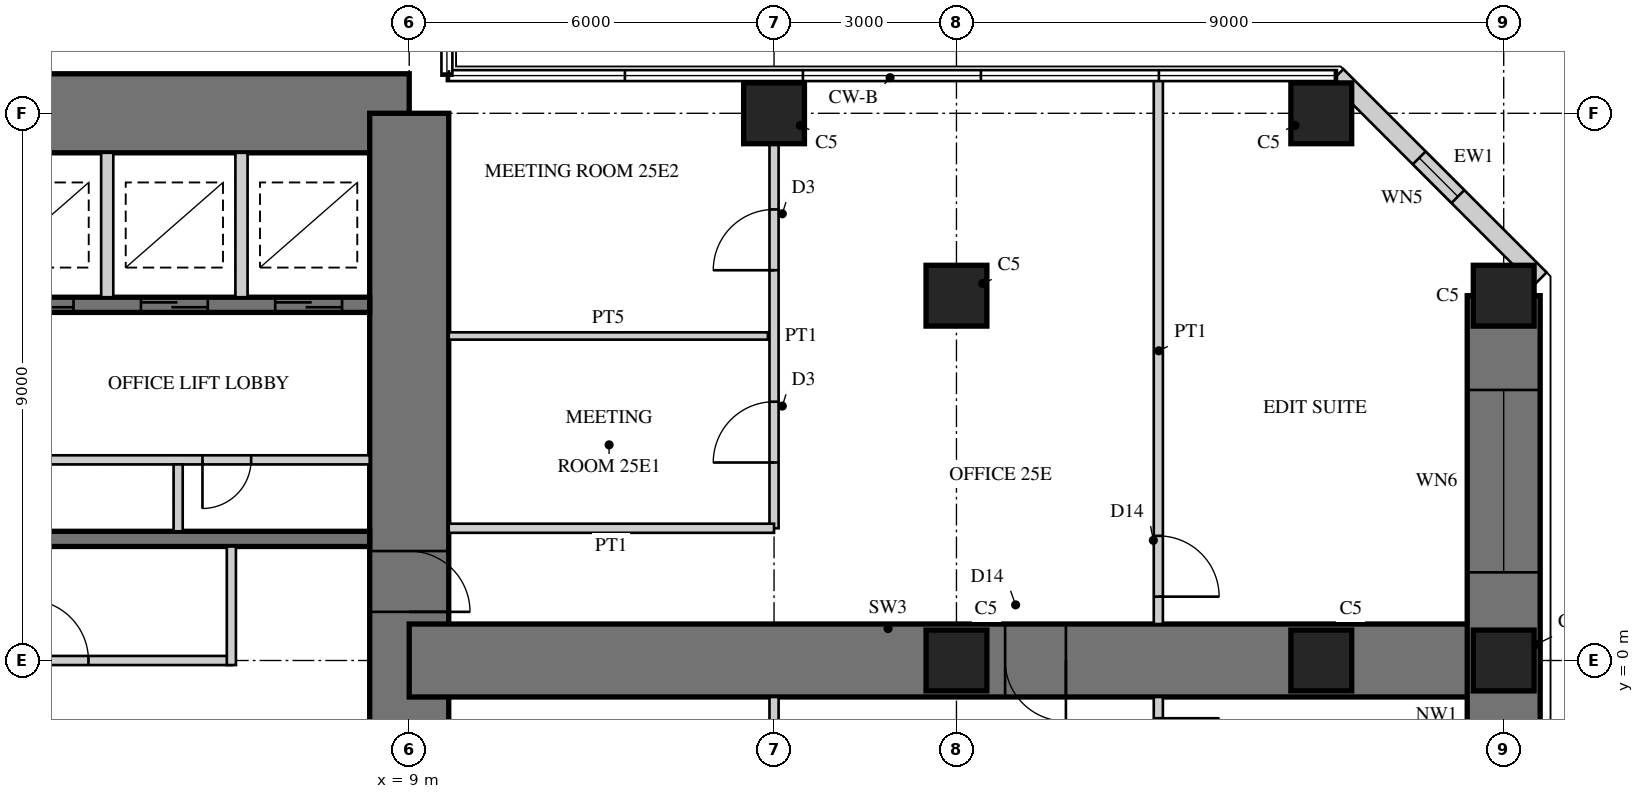
"""IFC4 building model, lengths in metres.
Left out: names, types, materials, properties, quantities, classifications, styles, units other than length and angle.
Written with IfcOpenShell. Run it as: python <this file> out.ifc"""

import sys

from ifc_helpers import new_model, si_unit, direction, frame, frame_2d, origin, origin_2d, place, context, subcontext, project, spatial, rectangle, hollow_rectangle, extrude, element, fill, save


model = new_model("IFC4")
c1 = context("Model", 3, precision=1e-05, world=origin(), true_north=direction((0.0, 1.0)))
c2 = subcontext(c1, "Body", "Model", "MODEL_VIEW")
j1 = project(units=[si_unit("LENGTHUNIT", "METRE"), si_unit("PLANEANGLEUNIT", "RADIAN")], contexts=[c1])
p1 = place(None, origin())
s1 = spatial("IfcSite", under=j1, at=p1, CompositionType="ELEMENT")
p2 = place(p1, origin())
s2 = spatial("IfcBuilding", under=s1, at=p2, CompositionType="ELEMENT")
p3 = place(p2, frame((0.0, 0.0, 104.5)))
s3 = spatial("IfcBuildingStorey", under=s2, at=p3, CompositionType="ELEMENT", Elevation=104.5)
p4 = place(p3, frame((9.0, 9.0, 0.0), z_axis=(0.0, 0.0, 1.0), x_axis=(-1.0, 0.0, 0.0)))
e1 = element("IfcWall", 1, at=p4, inside=s3, PredefinedType="SHEAR", context=c2, shape_type="SweptSolid", body=[
    extrude(rectangle(XDim=18.0, YDim=1.3, at=frame_2d((9.0, 0.0))), origin(), (0.0, 0.0, 1.0), 4.0),
])
p5 = place(p4, frame((9.8, 0.0, 0.0)))
e2 = element("IfcOpeningElement", 2, at=p5, cuts=e1, PredefinedType="OPENING", context=c2, shape_type="SweptSolid", body=[
    extrude(rectangle(XDim=1.0, YDim=2.4, at=frame_2d((0.5, 1.2))), frame((0.0, 0.66, 0.0), z_axis=(0.0, -1.0, 0.0), x_axis=(1.0, 0.0, 0.0)), (0.0, 0.0, 1.0), 1.32),
])
p6 = place(p3, frame((9.0, -9.0, 0.0), z_axis=(0.0, 0.0, 1.0), x_axis=(0.0, 1.0, 0.0)))
e3 = element("IfcWall", 3, at=p6, inside=s3, PredefinedType="SHEAR", context=c2, shape_type="SweptSolid", body=[
    extrude(rectangle(XDim=18.0, YDim=1.3, at=frame_2d((9.0, 0.0))), origin(), (0.0, 0.0, 1.0), 4.0),
])
p7 = place(p6, frame((9.8, 0.0, 0.0)))
e4 = element("IfcOpeningElement", 4, at=p7, cuts=e3, PredefinedType="OPENING", context=c2, shape_type="SweptSolid", body=[
    extrude(rectangle(XDim=1.0, YDim=2.4, at=frame_2d((0.5, 1.2))), frame((0.0, 0.66, 0.0), z_axis=(0.0, -1.0, 0.0), x_axis=(1.0, 0.0, 0.0)), (0.0, 0.0, 1.0), 1.32),
])
p8 = place(p3, frame((1.925, 2.0, 0.0), z_axis=(0.0, 0.0, 1.0), x_axis=(1.0, 0.0, 0.0)))
e5 = element("IfcWall", 5, at=p8, inside=s3, PredefinedType="SHEAR", context=c2, shape_type="SweptSolid", body=[
    extrude(rectangle(XDim=6.425, YDim=0.25, at=frame_2d((3.212, 0.0))), origin(), (0.0, 0.0, 1.0), 4.0),
])
p9 = place(p3, frame((1.925, 5.85, 0.0), z_axis=(0.0, 0.0, 1.0), x_axis=(1.0, 0.0, 0.0)))
e6 = element("IfcWall", 6, at=p9, inside=s3, PredefinedType="SHEAR", context=c2, shape_type="SweptSolid", body=[
    extrude(rectangle(XDim=6.425, YDim=0.25, at=frame_2d((3.212, 0.0))), origin(), (0.0, 0.0, 1.0), 4.0),
])
p10 = place(p9, frame((0.454, 0.0, 0.0)))
e7 = element("IfcOpeningElement", 7, at=p10, cuts=e6, PredefinedType="OPENING", context=c2, shape_type="SweptSolid", body=[
    extrude(rectangle(XDim=1.1, YDim=2.2, at=frame_2d((0.55, 1.1))), frame((0.0, 0.135, 0.0), z_axis=(0.0, -1.0, 0.0), x_axis=(1.0, 0.0, 0.0)), (0.0, 0.0, 1.0), 0.27),
])
p11 = place(p9, frame((2.663, 0.0, 0.0)))
e8 = element("IfcOpeningElement", 8, at=p11, cuts=e6, PredefinedType="OPENING", context=c2, shape_type="SweptSolid", body=[
    extrude(rectangle(XDim=1.1, YDim=2.2, at=frame_2d((0.55, 1.1))), frame((0.0, 0.135, 0.0), z_axis=(0.0, -1.0, 0.0), x_axis=(1.0, 0.0, 0.0)), (0.0, 0.0, 1.0), 0.27),
])
p12 = place(p9, frame((4.871, 0.0, 0.0)))
e9 = element("IfcOpeningElement", 9, at=p12, cuts=e6, PredefinedType="OPENING", context=c2, shape_type="SweptSolid", body=[
    extrude(rectangle(XDim=1.1, YDim=2.2, at=frame_2d((0.55, 1.1))), frame((0.0, 0.135, 0.0), z_axis=(0.0, -1.0, 0.0), x_axis=(1.0, 0.0, 0.0)), (0.0, 0.0, 1.0), 0.27),
])
p13 = place(p3, frame((1.925, 3.3, 0.0), z_axis=(0.0, 0.0, 1.0), x_axis=(1.0, 0.0, 0.0)))
e10 = element("IfcWall", 10, at=p13, inside=s3, PredefinedType="PARTITIONING", context=c2, shape_type="SweptSolid", body=[
    extrude(rectangle(XDim=6.425, YDim=0.15, at=frame_2d((3.212, 0.0))), origin(), (0.0, 0.0, 1.0), 4.0),
])
p14 = place(p13, frame((0.075, 0.0, 0.0)))
e11 = element("IfcOpeningElement", 11, at=p14, cuts=e10, PredefinedType="OPENING", context=c2, shape_type="SweptSolid", body=[
    extrude(rectangle(XDim=0.8, YDim=2.1, at=frame_2d((0.4, 1.05))), frame((0.0, 0.085, 0.0), z_axis=(0.0, -1.0, 0.0), x_axis=(1.0, 0.0, 0.0)), (0.0, 0.0, 1.0), 0.17),
])
p15 = place(p13, frame((3.675, 0.0, 0.0)))
e12 = element("IfcOpeningElement", 12, at=p15, cuts=e10, PredefinedType="OPENING", context=c2, shape_type="SweptSolid", body=[
    extrude(rectangle(XDim=0.8, YDim=2.1, at=frame_2d((0.4, 1.05))), frame((0.0, 0.085, 0.0), z_axis=(0.0, -1.0, 0.0), x_axis=(1.0, 0.0, 0.0)), (0.0, 0.0, 1.0), 0.17),
])
p16 = place(p3, frame((5.2, 2.125, 0.0), z_axis=(0.0, 0.0, 1.0), x_axis=(0.0, 1.0, 0.0)))
e13 = element("IfcWall", 13, at=p16, inside=s3, PredefinedType="PARTITIONING", context=c2, shape_type="SweptSolid", body=[
    extrude(rectangle(XDim=1.1, YDim=0.15, at=frame_2d((0.55, 0.0))), origin(), (0.0, 0.0, 1.0), 4.0),
])
for number, where, z_axis, x_axis in (
    (14, (4.033, 5.975, 0.0), (0.0, 0.0, 1.0), (0.0, 1.0, 0.0)),
    (15, (6.242, 5.975, 0.0), (0.0, 0.0, 1.0), (0.0, 1.0, 0.0)),
):
    element("IfcWall", number, at=place(p3, frame(where, z_axis=z_axis, x_axis=x_axis)), inside=s3, PredefinedType="PARTITIONING", context=c2, shape_type="SweptSolid", body=[
        extrude(rectangle(XDim=2.375, YDim=0.2, at=frame_2d((1.188, 0.0))), origin(), (0.0, 0.0, 1.0), 4.0),
    ])
p17 = place(p3, frame((9.0, 0.0, 0.0), z_axis=(0.0, 0.0, 1.0), x_axis=(1.0, 0.0, 0.0)))
e16 = element("IfcWall", 16, at=p17, inside=s3, PredefinedType="SHEAR", context=c2, shape_type="SweptSolid", body=[
    extrude(rectangle(XDim=18.0, YDim=1.2, at=frame_2d((9.0, 0.0))), origin(), (0.0, 0.0, 1.0), 4.0),
])
p18 = place(p17, frame((9.8, 0.0, 0.0)))
e17 = element("IfcOpeningElement", 17, at=p18, cuts=e16, PredefinedType="OPENING", context=c2, shape_type="SweptSolid", body=[
    extrude(rectangle(XDim=1.0, YDim=2.2, at=frame_2d((0.5, 1.1))), frame((0.0, 0.61, 0.0), z_axis=(0.0, -1.0, 0.0), x_axis=(1.0, 0.0, 0.0)), (0.0, 0.0, 1.0), 1.22),
])
p19 = place(p3, frame((27.0, -6.0, 0.0), z_axis=(0.0, 0.0, 1.0), x_axis=(0.0, 1.0, 0.0)))
e18 = element("IfcWall", 18, at=p19, inside=s3, PredefinedType="SHEAR", context=c2, shape_type="SweptSolid", body=[
    extrude(rectangle(XDim=12.0, YDim=1.2, at=frame_2d((6.0, 0.0))), origin(), (0.0, 0.0, 1.0), 4.0),
])
p20 = place(p19, frame((1.55, 0.0, 0.6)))
e19 = element("IfcOpeningElement", 19, at=p20, cuts=e18, PredefinedType="OPENING", context=c2, shape_type="SweptSolid", body=[
    extrude(rectangle(XDim=3.0, YDim=2.4, at=frame_2d((1.5, 1.2))), frame((0.0, 0.61, 0.0), z_axis=(0.0, -1.0, 0.0), x_axis=(1.0, 0.0, 0.0)), (0.0, 0.0, 1.0), 1.22),
])
p21 = place(p19, frame((7.45, 0.0, 0.6)))
e20 = element("IfcOpeningElement", 20, at=p21, cuts=e18, PredefinedType="OPENING", context=c2, shape_type="SweptSolid", body=[
    extrude(rectangle(XDim=3.0, YDim=2.4, at=frame_2d((1.5, 1.2))), frame((0.0, 0.61, 0.0), z_axis=(0.0, -1.0, 0.0), x_axis=(1.0, 0.0, 0.0)), (0.0, 0.0, 1.0), 1.22),
])
for number, where, z_axis, x_axis in (
    (21, (15.0, 9.0, 0.0), (0.0, 0.0, 1.0), (1.0, 0.0, 0.0)),
    (22, (24.0, 9.0, 0.0), (0.0, 0.0, 1.0), (1.0, 0.0, 0.0)),
    (23, (27.0, 0.0, 0.0), (0.0, 0.0, 1.0), (1.0, 0.0, 0.0)),
    (24, (27.0, 6.0, 0.0), (0.0, 0.0, 1.0), (1.0, 0.0, 0.0)),
    (25, (18.0, 0.0, 0.0), (0.0, 0.0, 1.0), (1.0, 0.0, 0.0)),
    (26, (18.0, 6.0, 0.0), (0.0, 0.0, 1.0), (1.0, 0.0, 0.0)),
    (27, (24.0, 0.0, 0.0), (0.0, 0.0, 1.0), (1.0, 0.0, 0.0)),
):
    element("IfcColumn", number, at=place(p3, frame(where, z_axis=z_axis, x_axis=x_axis)), inside=s3, PredefinedType="COLUMN", context=c2, shape_type="SweptSolid", body=[
        extrude(rectangle(XDim=1.0, YDim=1.0, at=origin_2d()), origin(), (0.0, 0.0, 1.0), 4.0),
    ])
p22 = place(p3, frame((27.6, 6.277, 0.0), z_axis=(0.0, 0.0, 1.0), x_axis=(-0.707106781187, 0.707106781187, 0.0)))
e28 = element("IfcWall", 28, at=p22, inside=s3, PredefinedType="SOLIDWALL", context=c2, shape_type="SweptSolid", body=[
    extrude(rectangle(XDim=4.728, YDim=0.3, at=frame_2d((2.364, 0.0))), origin(), (0.0, 0.0, 1.0), 3.8),
])
p23 = place(p22, frame((1.914, 0.0, 0.3)))
e29 = element("IfcOpeningElement", 29, at=p23, cuts=e28, PredefinedType="OPENING", context=c2, shape_type="SweptSolid", body=[
    extrude(rectangle(XDim=0.9, YDim=2.4, at=frame_2d((0.45, 1.2))), frame((0.0, 0.16, 0.0), z_axis=(0.0, -1.0, 0.0), x_axis=(1.0, 0.0, 0.0)), (0.0, 0.0, 1.0), 0.32),
])
p24 = place(p3, frame((2.325, 0.0, 0.0), z_axis=(0.0, 0.0, 1.0), x_axis=(1.0, 0.0, 0.0)))
e30 = element("IfcWall", 30, at=p24, inside=s3, PredefinedType="PARTITIONING", context=c2, shape_type="SweptSolid", body=[
    extrude(rectangle(XDim=3.75, YDim=0.15, at=frame_2d((1.875, 0.0))), origin(), (0.0, 0.0, 1.0), 3.8),
])
p25 = place(p24, frame((0.4, 0.0, 0.0)))
e31 = element("IfcOpeningElement", 31, at=p25, cuts=e30, PredefinedType="OPENING", context=c2, shape_type="SweptSolid", body=[
    extrude(rectangle(XDim=1.0, YDim=2.1, at=frame_2d((0.5, 1.05))), frame((0.0, 0.085, 0.0), z_axis=(0.0, -1.0, 0.0), x_axis=(1.0, 0.0, 0.0)), (0.0, 0.0, 1.0), 0.17),
])
p26 = place(p3, frame((6.075, -0.075, 0.0), z_axis=(0.0, 0.0, 1.0), x_axis=(0.0, 1.0, 0.0)))
e32 = element("IfcWall", 32, at=p26, inside=s3, PredefinedType="PARTITIONING", context=c2, shape_type="SweptSolid", body=[
    extrude(rectangle(XDim=1.95, YDim=0.15, at=frame_2d((0.975, 0.0))), origin(), (0.0, 0.0, 1.0), 3.8),
])
p27 = place(p3, frame((15.0, 2.175, 0.0), z_axis=(0.0, 0.0, 1.0), x_axis=(0.0, 1.0, 0.0)))
e33 = element("IfcWall", 33, at=p27, inside=s3, PredefinedType="PARTITIONING", context=c2, shape_type="SweptSolid", body=[
    extrude(rectangle(XDim=6.325, YDim=0.15, at=frame_2d((3.163, 0.0))), origin(), (0.0, 0.0, 1.0), 3.0),
])
p28 = place(p27, frame((1.081, 0.0, 0.0)))
e34 = element("IfcOpeningElement", 34, at=p28, cuts=e33, PredefinedType="OPENING", context=c2, shape_type="SweptSolid", body=[
    extrude(rectangle(XDim=1.0, YDim=2.1, at=frame_2d((0.5, 1.05))), frame((0.0, 0.085, 0.0), z_axis=(0.0, -1.0, 0.0), x_axis=(1.0, 0.0, 0.0)), (0.0, 0.0, 1.0), 0.17),
])
p29 = place(p27, frame((4.244, 0.0, 0.0)))
e35 = element("IfcOpeningElement", 35, at=p29, cuts=e33, PredefinedType="OPENING", context=c2, shape_type="SweptSolid", body=[
    extrude(rectangle(XDim=1.0, YDim=2.1, at=frame_2d((0.5, 1.05))), frame((0.0, 0.085, 0.0), z_axis=(0.0, -1.0, 0.0), x_axis=(1.0, 0.0, 0.0)), (0.0, 0.0, 1.0), 0.17),
])
p30 = place(p3, frame((9.65, 2.175, 0.0), z_axis=(0.0, 0.0, 1.0), x_axis=(1.0, 0.0, 0.0)))
e36 = element("IfcWall", 36, at=p30, inside=s3, PredefinedType="PARTITIONING", context=c2, shape_type="SweptSolid", body=[
    extrude(rectangle(XDim=5.35, YDim=0.15, at=frame_2d((2.675, 0.0))), origin(), (0.0, 0.0, 1.0), 3.8),
])
p31 = place(p3, frame((9.65, 5.337, 0.0), z_axis=(0.0, 0.0, 1.0), x_axis=(1.0, 0.0, 0.0)))
e37 = element("IfcWall", 37, at=p31, inside=s3, PredefinedType="PLUMBINGWALL", context=c2, shape_type="SweptSolid", body=[
    extrude(rectangle(XDim=5.25, YDim=0.12, at=frame_2d((2.625, 0.0))), origin(), (0.0, 0.0, 1.0), 3.8),
])
p32 = place(p3, frame((15.0, -8.5, 0.0), z_axis=(0.0, 0.0, 1.0), x_axis=(0.0, 1.0, 0.0)))
e38 = element("IfcWall", 38, at=p32, inside=s3, PredefinedType="PARTITIONING", context=c2, shape_type="SweptSolid", body=[
    extrude(rectangle(XDim=7.9, YDim=0.15, at=frame_2d((3.95, 0.0))), origin(), (0.0, 0.0, 1.0), 3.0),
])
p33 = place(p32, frame((3.45, 0.0, 0.0)))
e39 = element("IfcOpeningElement", 39, at=p33, cuts=e38, PredefinedType="OPENING", context=c2, shape_type="SweptSolid", body=[
    extrude(rectangle(XDim=1.0, YDim=2.1, at=frame_2d((0.5, 1.05))), frame((0.0, 0.085, 0.0), z_axis=(0.0, -1.0, 0.0), x_axis=(1.0, 0.0, 0.0)), (0.0, 0.0, 1.0), 0.17),
])
p34 = place(p3, frame((21.32, 0.6, 0.0), z_axis=(0.0, 0.0, 1.0), x_axis=(0.0, 1.0, 0.0)))
e40 = element("IfcWall", 40, at=p34, inside=s3, PredefinedType="PARTITIONING", context=c2, shape_type="SweptSolid", body=[
    extrude(rectangle(XDim=8.98, YDim=0.15, at=frame_2d((4.49, 0.0))), origin(), (0.0, 0.0, 1.0), 3.8),
])
p35 = place(p34, frame((0.45, 0.0, 0.0)))
e41 = element("IfcOpeningElement", 41, at=p35, cuts=e40, PredefinedType="OPENING", context=c2, shape_type="SweptSolid", body=[
    extrude(rectangle(XDim=1.0, YDim=2.2, at=frame_2d((0.5, 1.1))), frame((0.0, 0.085, 0.0), z_axis=(0.0, -1.0, 0.0), x_axis=(1.0, 0.0, 0.0)), (0.0, 0.0, 1.0), 0.17),
])
p36 = place(p3, frame((21.32, -9.58, 0.0), z_axis=(0.0, 0.0, 1.0), x_axis=(0.0, 1.0, 0.0)))
e42 = element("IfcWall", 42, at=p36, inside=s3, PredefinedType="PARTITIONING", context=c2, shape_type="SweptSolid", body=[
    extrude(rectangle(XDim=8.98, YDim=0.15, at=frame_2d((4.49, 0.0))), origin(), (0.0, 0.0, 1.0), 3.8),
])
p37 = place(p36, frame((4.987, 0.0, 0.0)))
e43 = element("IfcOpeningElement", 43, at=p37, cuts=e42, PredefinedType="OPENING", context=c2, shape_type="SweptSolid", body=[
    extrude(rectangle(XDim=1.0, YDim=2.2, at=frame_2d((0.5, 1.1))), frame((0.0, 0.085, 0.0), z_axis=(0.0, -1.0, 0.0), x_axis=(1.0, 0.0, 0.0)), (0.0, 0.0, 1.0), 0.17),
])
p38 = place(p36, frame((7.63, 0.0, 0.0)))
e44 = element("IfcOpeningElement", 44, at=p38, cuts=e42, PredefinedType="OPENING", context=c2, shape_type="SweptSolid", body=[
    extrude(rectangle(XDim=1.0, YDim=2.2, at=frame_2d((0.5, 1.1))), frame((0.0, 0.085, 0.0), z_axis=(0.0, -1.0, 0.0), x_axis=(1.0, 0.0, 0.0)), (0.0, 0.0, 1.0), 0.17),
])
p39 = place(p21, origin())
e45 = element("IfcWindow", 45, at=p39, inside=s3, PartitioningType="SINGLE_PANEL", PredefinedType="WINDOW", context=c2, shape_type="SweptSolid", body=[
    extrude(hollow_rectangle(XDim=3.0, YDim=2.4, WallThickness=0.06, at=frame_2d((1.5, 1.2))), frame((0.0, 0.03, 0.0), z_axis=(0.0, -1.0, 0.0), x_axis=(1.0, 0.0, 0.0)), (0.0, 0.0, 1.0), 0.06),
    extrude(rectangle(XDim=2.879, YDim=2.279, at=frame_2d((1.5, 1.2))), frame((0.0, 0.03, 0.0), z_axis=(0.0, -1.0, 0.0), x_axis=(1.0, 0.0, 0.0)), (0.0, 0.0, 1.0), 0.06),
])
fill(e20, e45)
p40 = place(p23, origin())
e46 = element("IfcWindow", 46, at=p40, inside=s3, PartitioningType="SINGLE_PANEL", PredefinedType="WINDOW", context=c2, shape_type="SweptSolid", body=[
    extrude(hollow_rectangle(XDim=0.9, YDim=2.4, WallThickness=0.06, at=frame_2d((0.45, 1.2))), frame((0.0, 0.03, 0.0), z_axis=(0.0, -1.0, 0.0), x_axis=(1.0, 0.0, 0.0)), (0.0, 0.0, 1.0), 0.06),
    extrude(rectangle(XDim=0.779, YDim=2.279, at=frame_2d((0.45, 1.2))), frame((0.0, 0.03, 0.0), z_axis=(0.0, -1.0, 0.0), x_axis=(1.0, 0.0, 0.0)), (0.0, 0.0, 1.0), 0.06),
])
fill(e29, e46)
p41 = place(p25, origin())
e47 = element("IfcDoor", 47, at=p41, inside=s3, OperationType="SINGLE_SWING_LEFT", PredefinedType="DOOR", context=c2, shape_type="SweptSolid", body=[
    extrude(rectangle(XDim=1.0, YDim=2.1, at=frame_2d((0.5, 1.05))), frame((0.0, 0.025, 0.0), z_axis=(0.0, -1.0, 0.0), x_axis=(1.0, 0.0, 0.0)), (0.0, 0.0, 1.0), 0.05),
])
fill(e31, e47)
p42 = place(p28, origin())
e48 = element("IfcDoor", 48, at=p42, inside=s3, OperationType="SINGLE_SWING_LEFT", PredefinedType="DOOR", context=c2, shape_type="SweptSolid", body=[
    extrude(rectangle(XDim=1.0, YDim=2.1, at=frame_2d((0.5, 1.05))), frame((0.0, 0.025, 0.0), z_axis=(0.0, -1.0, 0.0), x_axis=(1.0, 0.0, 0.0)), (0.0, 0.0, 1.0), 0.05),
])
fill(e34, e48)
p43 = place(p29, origin())
e49 = element("IfcDoor", 49, at=p43, inside=s3, OperationType="SINGLE_SWING_LEFT", PredefinedType="DOOR", context=c2, shape_type="SweptSolid", body=[
    extrude(rectangle(XDim=1.0, YDim=2.1, at=frame_2d((0.5, 1.05))), frame((0.0, 0.025, 0.0), z_axis=(0.0, -1.0, 0.0), x_axis=(1.0, 0.0, 0.0)), (0.0, 0.0, 1.0), 0.05),
])
fill(e35, e49)
p44 = place(p35, frame((1.0, 0.0, 0.0), z_axis=(0.0, 0.0, 1.0), x_axis=(-1.0, 0.0, 0.0)))
e50 = element("IfcDoor", 50, at=p44, inside=s3, OperationType="SINGLE_SWING_RIGHT", PredefinedType="DOOR", context=c2, shape_type="SweptSolid", body=[
    extrude(rectangle(XDim=1.0, YDim=2.2, at=frame_2d((0.5, 1.1))), frame((0.0, 0.025, 0.0), z_axis=(0.0, -1.0, 0.0), x_axis=(1.0, 0.0, 0.0)), (0.0, 0.0, 1.0), 0.05),
])
fill(e41, e50)
p45 = place(p38, frame((1.0, 0.0, 0.0), z_axis=(0.0, 0.0, 1.0), x_axis=(-1.0, 0.0, 0.0)))
e51 = element("IfcDoor", 51, at=p45, inside=s3, OperationType="SINGLE_SWING_LEFT", PredefinedType="DOOR", context=c2, shape_type="SweptSolid", body=[
    extrude(rectangle(XDim=1.0, YDim=2.2, at=frame_2d((0.5, 1.1))), frame((0.0, 0.025, 0.0), z_axis=(0.0, -1.0, 0.0), x_axis=(1.0, 0.0, 0.0)), (0.0, 0.0, 1.0), 0.05),
])
fill(e44, e51)
p46 = place(p18, frame((1.0, 0.0, 0.0), z_axis=(0.0, 0.0, 1.0), x_axis=(-1.0, 0.0, 0.0)))
e52 = element("IfcDoor", 52, at=p46, inside=s3, OperationType="SINGLE_SWING_LEFT", PredefinedType="DOOR", context=c2, shape_type="SweptSolid", body=[
    extrude(rectangle(XDim=1.0, YDim=2.2, at=frame_2d((0.5, 1.1))), frame((0.0, 0.025, 0.0), z_axis=(0.0, -1.0, 0.0), x_axis=(1.0, 0.0, 0.0)), (0.0, 0.0, 1.0), 0.05),
])
fill(e17, e52)
p47 = place(p7, frame((1.0, 0.0, 0.0), z_axis=(0.0, 0.0, 1.0), x_axis=(-1.0, 0.0, 0.0)))
e53 = element("IfcDoor", 53, at=p47, inside=s3, OperationType="SINGLE_SWING_RIGHT", PredefinedType="DOOR", context=c2, shape_type="SweptSolid", body=[
    extrude(rectangle(XDim=1.0, YDim=2.4, at=frame_2d((0.5, 1.2))), frame((0.0, -0.005, 0.0), z_axis=(0.0, -1.0, 0.0), x_axis=(1.0, 0.0, 0.0)), (0.0, 0.0, 1.0), 0.05),
])
fill(e4, e53)
p48 = place(p10, origin())
e54 = element("IfcDoor", 54, at=p48, inside=s3, OperationType="DOUBLE_DOOR_SLIDING", PredefinedType="DOOR", context=c2, shape_type="SweptSolid", body=[
    extrude(rectangle(XDim=1.1, YDim=2.2, at=frame_2d((0.55, 1.1))), frame((0.0, 0.025, 0.0), z_axis=(0.0, -1.0, 0.0), x_axis=(1.0, 0.0, 0.0)), (0.0, 0.0, 1.0), 0.05),
])
fill(e7, e54)
p49 = place(p11, origin())
e55 = element("IfcDoor", 55, at=p49, inside=s3, OperationType="DOUBLE_DOOR_SLIDING", PredefinedType="DOOR", context=c2, shape_type="SweptSolid", body=[
    extrude(rectangle(XDim=1.1, YDim=2.2, at=frame_2d((0.55, 1.1))), frame((0.0, 0.025, 0.0), z_axis=(0.0, -1.0, 0.0), x_axis=(1.0, 0.0, 0.0)), (0.0, 0.0, 1.0), 0.05),
])
fill(e8, e55)
p50 = place(p12, origin())
e56 = element("IfcDoor", 56, at=p50, inside=s3, OperationType="DOUBLE_DOOR_SLIDING", PredefinedType="DOOR", context=c2, shape_type="SweptSolid", body=[
    extrude(rectangle(XDim=1.1, YDim=2.2, at=frame_2d((0.55, 1.1))), frame((0.0, 0.025, 0.0), z_axis=(0.0, -1.0, 0.0), x_axis=(1.0, 0.0, 0.0)), (0.0, 0.0, 1.0), 0.05),
])
fill(e9, e56)
p51 = place(p15, frame((0.8, 0.0, 0.0), z_axis=(0.0, 0.0, 1.0), x_axis=(-1.0, 0.0, 0.0)))
e57 = element("IfcDoor", 57, at=p51, inside=s3, OperationType="SINGLE_SWING_RIGHT", PredefinedType="DOOR", context=c2, shape_type="SweptSolid", body=[
    extrude(rectangle(XDim=0.8, YDim=2.1, at=frame_2d((0.4, 1.05))), frame((0.0, 0.025, 0.0), z_axis=(0.0, -1.0, 0.0), x_axis=(1.0, 0.0, 0.0)), (0.0, 0.0, 1.0), 0.05),
])
fill(e12, e57)
save(model, sys.argv[1])
